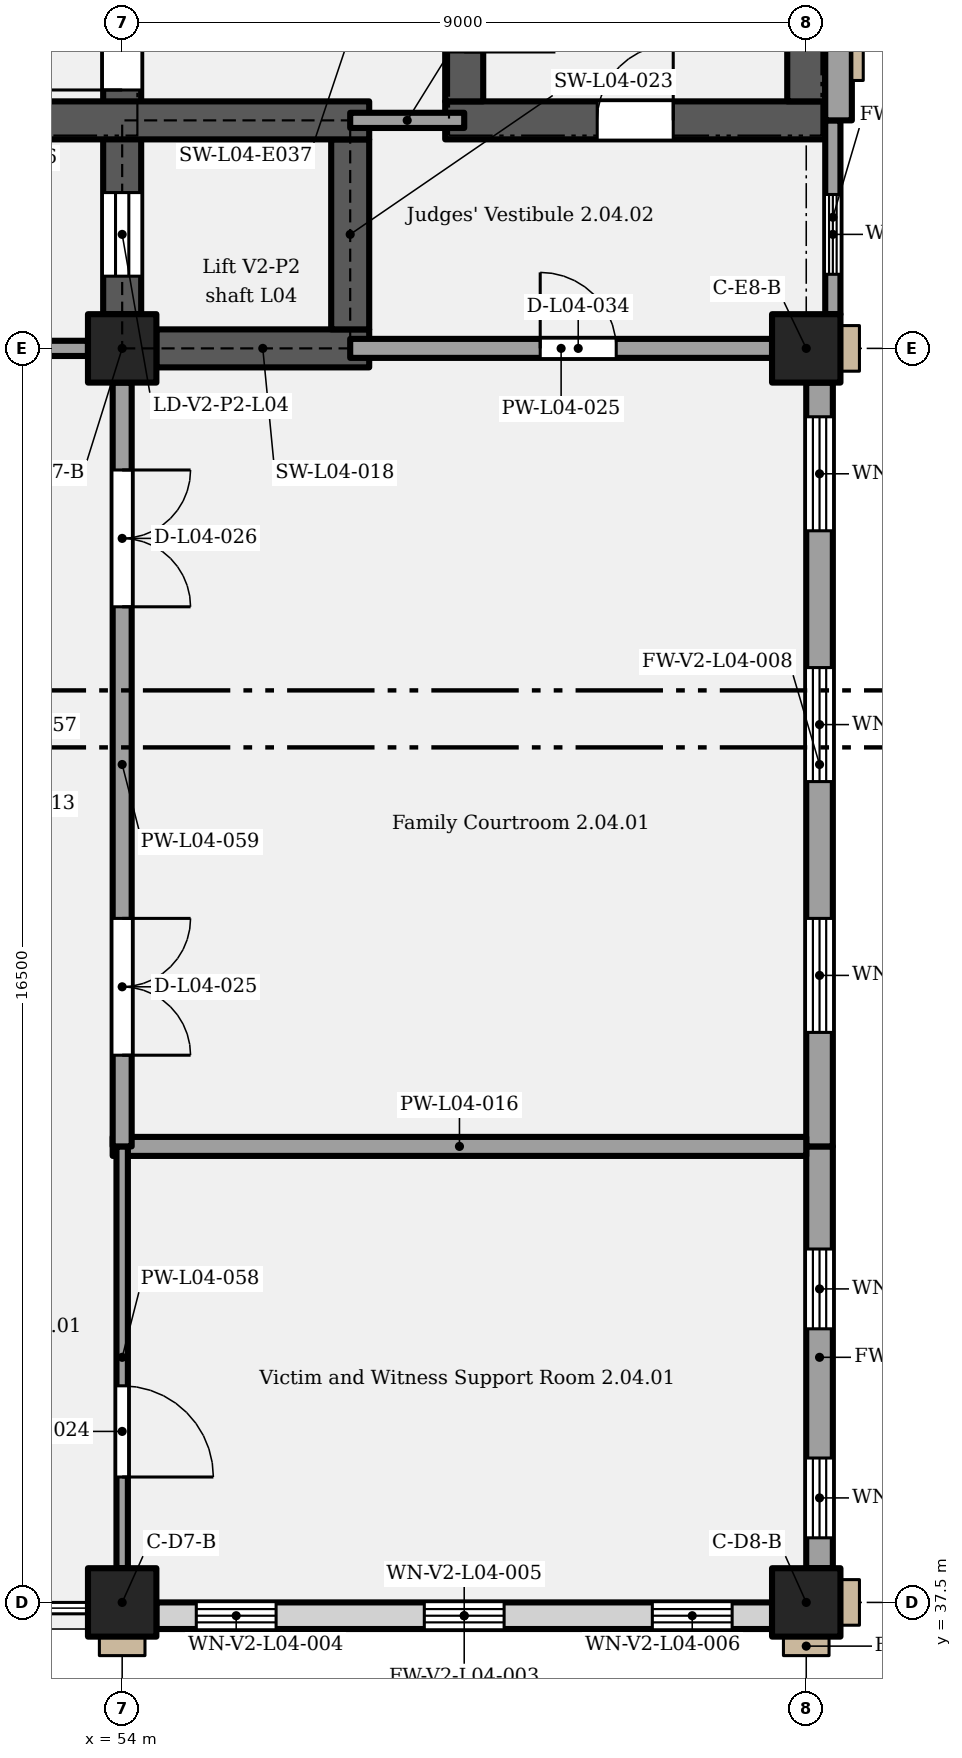
"""IFC4 building model, lengths in metres.
Left out: names, types, materials, properties, quantities, classifications, styles, units other than length and angle.
Written with IfcOpenShell. Run it as: python <this file> out.ifc"""

import sys

from ifc_helpers import new_model, si_unit, direction, frame, frame_2d, origin, origin_2d, place, context, subcontext, project, spatial, rectangle, extrude, element, fill, save


model = new_model("IFC4")
c1 = context("Model", 3, precision=1e-05, world=origin(), true_north=direction((0.0, 1.0)))
c2 = subcontext(c1, "Body", "Model", "MODEL_VIEW")
j1 = project(units=[si_unit("LENGTHUNIT", "METRE"), si_unit("PLANEANGLEUNIT", "RADIAN")], contexts=[c1])
p1 = place(None, origin())
s1 = spatial("IfcSite", under=j1, at=p1, CompositionType="ELEMENT")
p2 = place(p1, origin())
s2 = spatial("IfcBuilding", under=s1, at=p2, CompositionType="ELEMENT")
p3 = place(p2, frame((0.0, 0.0, 22.8)))
s3 = spatial("IfcBuildingStorey", under=s2, at=p3, CompositionType="ELEMENT", Elevation=22.8)
for number, where, z_axis, x_axis in (
    (1, (54.0, 37.5, 0.0), (0.0, 0.0, 1.0), (1.0, 0.0, 0.0)),
    (2, (63.0, 37.5, 0.0), (0.0, 0.0, 1.0), (1.0, 0.0, 0.0)),
    (3, (54.0, 54.0, 0.0), (0.0, 0.0, 1.0), (1.0, 0.0, 0.0)),
    (4, (63.0, 54.0, 0.0), (0.0, 0.0, 1.0), (1.0, 0.0, 0.0)),
):
    element("IfcColumn", number, at=place(p3, frame(where, z_axis=z_axis, x_axis=x_axis)), inside=s3, PredefinedType="COLUMN", context=c2, shape_type="SweptSolid", body=[
        extrude(rectangle(XDim=0.9, YDim=0.9, at=origin_2d()), origin(), (0.0, 0.0, 1.0), 5.4),
    ])
p4 = place(p3, frame((54.45, 54.0, 0.0), z_axis=(0.0, 0.0, 1.0), x_axis=(1.0, 0.0, 0.0)))
e5 = element("IfcWall", 5, at=p4, inside=s3, PredefinedType="SHEAR", context=c2, shape_type="SweptSolid", body=[
    extrude(rectangle(XDim=2.8, YDim=0.5, at=frame_2d((1.4, 0.0))), origin(), (0.0, 0.0, 1.0), 5.15),
])
p5 = place(p3, frame((57.0, 54.25, 0.0), z_axis=(0.0, 0.0, 1.0), x_axis=(0.0, 1.0, 0.0)))
e6 = element("IfcWall", 6, at=p5, inside=s3, PredefinedType="SHEAR", context=c2, shape_type="SweptSolid", body=[
    extrude(rectangle(XDim=2.5, YDim=0.5, at=frame_2d((1.25, 0.0))), origin(), (0.0, 0.0, 1.0), 5.15),
])
p6 = place(p3, frame((54.0, 54.45, 0.0), z_axis=(0.0, 0.0, 1.0), x_axis=(0.0, 1.0, 0.0)))
e7 = element("IfcWall", 7, at=p6, inside=s3, PredefinedType="SHEAR", context=c2, shape_type="SweptSolid", body=[
    extrude(rectangle(XDim=11.1, YDim=0.5, at=frame_2d((5.55, 0.0))), origin(), (0.0, 0.0, 1.0), 5.15),
])
p7 = place(p6, frame((0.5, 0.0, 0.0)))
e8 = element("IfcOpeningElement", 8, at=p7, cuts=e7, PredefinedType="OPENING", context=c2, shape_type="SweptSolid", body=[
    extrude(rectangle(XDim=1.1, YDim=2.1, at=frame_2d((0.55, 1.05))), frame((0.0, 0.26, 0.0), z_axis=(0.0, -1.0, 0.0), x_axis=(1.0, 0.0, 0.0)), (0.0, 0.0, 1.0), 0.52),
])
p8 = place(p6, frame((2.95, 0.0, 0.0)))
e9 = element("IfcOpeningElement", 9, at=p8, cuts=e7, PredefinedType="OPENING", context=c2, shape_type="SweptSolid", body=[
    extrude(rectangle(XDim=1.2, YDim=2.1, at=frame_2d((0.6, 1.05))), frame((0.0, 0.26, 0.0), z_axis=(0.0, -1.0, 0.0), x_axis=(1.0, 0.0, 0.0)), (0.0, 0.0, 1.0), 0.52),
])
p9 = place(p3, frame((46.25, 57.0, 0.0), z_axis=(0.0, 0.0, 1.0), x_axis=(1.0, 0.0, 0.0)))
e10 = element("IfcWall", 10, at=p9, inside=s3, PredefinedType="SHEAR", context=c2, shape_type="SweptSolid", body=[
    extrude(rectangle(XDim=11.0, YDim=0.5, at=frame_2d((5.5, 0.0))), origin(), (0.0, 0.0, 1.0), 5.15),
])
p10 = place(p9, frame((4.9, 0.0, 0.0)))
e11 = element("IfcOpeningElement", 11, at=p10, cuts=e10, PredefinedType="OPENING", context=c2, shape_type="SweptSolid", body=[
    extrude(rectangle(XDim=1.2, YDim=2.1, at=frame_2d((0.6, 1.05))), frame((0.0, 0.26, 0.0), z_axis=(0.0, -1.0, 0.0), x_axis=(1.0, 0.0, 0.0)), (0.0, 0.0, 1.0), 0.52),
])
p11 = place(p3, frame((58.25, 57.0, 0.0), z_axis=(0.0, 0.0, 1.0), x_axis=(1.0, 0.0, 0.0)))
e12 = element("IfcWall", 12, at=p11, inside=s3, PredefinedType="SHEAR", context=c2, shape_type="SweptSolid", body=[
    extrude(rectangle(XDim=5.0, YDim=0.5, at=frame_2d((2.5, 0.0))), origin(), (0.0, 0.0, 1.0), 5.15),
])
p12 = place(p11, frame((2.0, 0.0, 0.0)))
e13 = element("IfcOpeningElement", 13, at=p12, cuts=e12, PredefinedType="OPENING", context=c2, shape_type="SweptSolid", body=[
    extrude(rectangle(XDim=1.0, YDim=2.1, at=frame_2d((0.5, 1.05))), frame((0.0, 0.26, 0.0), z_axis=(0.0, -1.0, 0.0), x_axis=(1.0, 0.0, 0.0)), (0.0, 0.0, 1.0), 0.52),
])
p13 = place(p3, frame((58.5, 57.25, 0.0), z_axis=(0.0, 0.0, 1.0), x_axis=(0.0, 1.0, 0.0)))
e14 = element("IfcWall", 14, at=p13, inside=s3, PredefinedType="SHEAR", context=c2, shape_type="SweptSolid", body=[
    extrude(rectangle(XDim=8.5, YDim=0.5, at=frame_2d((4.25, 0.0))), origin(), (0.0, 0.0, 1.0), 5.15),
])
p14 = place(p13, frame((1.85, 0.0, 0.0), z_axis=(0.0, 0.0, 1.0), x_axis=(-1.0, 0.0, 0.0)))
e15 = element("IfcOpeningElement", 15, at=p14, cuts=e14, PredefinedType="OPENING", context=c2, shape_type="SweptSolid", body=[
    extrude(rectangle(XDim=1.2, YDim=2.1, at=frame_2d((0.6, 1.05))), frame((0.0, 0.26, 0.0), z_axis=(0.0, -1.0, 0.0), x_axis=(1.0, 0.0, 0.0)), (0.0, 0.0, 1.0), 0.52),
])
p15 = place(p3, frame((63.0, 57.25, 0.0), z_axis=(0.0, 0.0, 1.0), x_axis=(0.0, 1.0, 0.0)))
e16 = element("IfcWall", 16, at=p15, inside=s3, PredefinedType="SHEAR", context=c2, shape_type="SweptSolid", body=[
    extrude(rectangle(XDim=8.3, YDim=0.5, at=frame_2d((4.15, 0.0))), origin(), (0.0, 0.0, 1.0), 5.15),
])
p16 = place(p3, frame((54.45, 37.325, 0.0), z_axis=(0.0, 0.0, 1.0), x_axis=(1.0, 0.0, 0.0)))
e17 = element("IfcWall", 17, at=p16, inside=s3, PredefinedType="SOLIDWALL", context=c2, shape_type="SweptSolid", body=[
    extrude(rectangle(XDim=8.1, YDim=0.35, at=frame_2d((4.05, 0.0))), origin(), (0.0, 0.0, 1.0), 5.15),
])
p17 = place(p16, frame((0.525, 0.0, 1.05)))
e18 = element("IfcOpeningElement", 18, at=p17, cuts=e17, PredefinedType="OPENING", context=c2, shape_type="SweptSolid", body=[
    extrude(rectangle(XDim=1.05, YDim=2.4, at=frame_2d((0.525, 1.2))), frame((0.0, 0.185, 0.0), z_axis=(0.0, -1.0, 0.0), x_axis=(1.0, 0.0, 0.0)), (0.0, 0.0, 1.0), 0.37),
])
p18 = place(p16, frame((3.525, 0.0, 1.05)))
e19 = element("IfcOpeningElement", 19, at=p18, cuts=e17, PredefinedType="OPENING", context=c2, shape_type="SweptSolid", body=[
    extrude(rectangle(XDim=1.05, YDim=2.4, at=frame_2d((0.525, 1.2))), frame((0.0, 0.185, 0.0), z_axis=(0.0, -1.0, 0.0), x_axis=(1.0, 0.0, 0.0)), (0.0, 0.0, 1.0), 0.37),
])
p19 = place(p16, frame((6.525, 0.0, 1.05)))
e20 = element("IfcOpeningElement", 20, at=p19, cuts=e17, PredefinedType="OPENING", context=c2, shape_type="SweptSolid", body=[
    extrude(rectangle(XDim=1.05, YDim=2.4, at=frame_2d((0.525, 1.2))), frame((0.0, 0.185, 0.0), z_axis=(0.0, -1.0, 0.0), x_axis=(1.0, 0.0, 0.0)), (0.0, 0.0, 1.0), 0.37),
])
p20 = place(p3, frame((63.175, 37.95, 0.0), z_axis=(0.0, 0.0, 1.0), x_axis=(0.0, 1.0, 0.0)))
e21 = element("IfcWall", 21, at=p20, inside=s3, PredefinedType="SOLIDWALL", context=c2, shape_type="SweptSolid", body=[
    extrude(rectangle(XDim=5.55, YDim=0.35, at=frame_2d((2.775, 0.0))), origin(), (0.0, 0.0, 1.0), 5.15),
])
p21 = place(p20, frame((0.4, 0.0, 1.05)))
e22 = element("IfcOpeningElement", 22, at=p21, cuts=e21, PredefinedType="OPENING", context=c2, shape_type="SweptSolid", body=[
    extrude(rectangle(XDim=1.05, YDim=2.4, at=frame_2d((0.525, 1.2))), frame((0.0, 0.185, 0.0), z_axis=(0.0, -1.0, 0.0), x_axis=(1.0, 0.0, 0.0)), (0.0, 0.0, 1.0), 0.37),
])
p22 = place(p20, frame((3.15, 0.0, 1.05)))
e23 = element("IfcOpeningElement", 23, at=p22, cuts=e21, PredefinedType="OPENING", context=c2, shape_type="SweptSolid", body=[
    extrude(rectangle(XDim=1.05, YDim=2.4, at=frame_2d((0.525, 1.2))), frame((0.0, 0.185, 0.0), z_axis=(0.0, -1.0, 0.0), x_axis=(1.0, 0.0, 0.0)), (0.0, 0.0, 1.0), 0.37),
])
p23 = place(p3, frame((63.175, 43.5, 0.0), z_axis=(0.0, 0.0, 1.0), x_axis=(0.0, 1.0, 0.0)))
e24 = element("IfcWall", 24, at=p23, inside=s3, PredefinedType="SOLIDWALL", context=c2, shape_type="SweptSolid", body=[
    extrude(rectangle(XDim=10.05, YDim=0.35, at=frame_2d((5.025, 0.0))), origin(), (0.0, 0.0, 1.0), 5.15),
])
p24 = place(p23, frame((1.5, 0.0, 1.05)))
e25 = element("IfcOpeningElement", 25, at=p24, cuts=e24, PredefinedType="OPENING", context=c2, shape_type="SweptSolid", body=[
    extrude(rectangle(XDim=1.5, YDim=3.5, at=frame_2d((0.75, 1.75))), frame((0.0, 0.185, 0.0), z_axis=(0.0, -1.0, 0.0), x_axis=(1.0, 0.0, 0.0)), (0.0, 0.0, 1.0), 0.37),
])
p25 = place(p23, frame((4.8, 0.0, 1.05)))
e26 = element("IfcOpeningElement", 26, at=p25, cuts=e24, PredefinedType="OPENING", context=c2, shape_type="SweptSolid", body=[
    extrude(rectangle(XDim=1.5, YDim=3.5, at=frame_2d((0.75, 1.75))), frame((0.0, 0.185, 0.0), z_axis=(0.0, -1.0, 0.0), x_axis=(1.0, 0.0, 0.0)), (0.0, 0.0, 1.0), 0.37),
])
p26 = place(p23, frame((8.1, 0.0, 1.05)))
e27 = element("IfcOpeningElement", 27, at=p26, cuts=e24, PredefinedType="OPENING", context=c2, shape_type="SweptSolid", body=[
    extrude(rectangle(XDim=1.5, YDim=3.5, at=frame_2d((0.75, 1.75))), frame((0.0, 0.185, 0.0), z_axis=(0.0, -1.0, 0.0), x_axis=(1.0, 0.0, 0.0)), (0.0, 0.0, 1.0), 0.37),
])
p27 = place(p3, frame((63.35, 54.45, 0.0), z_axis=(0.0, 0.0, 1.0), x_axis=(0.0, 1.0, 0.0)))
e28 = element("IfcWall", 28, at=p27, inside=s3, PredefinedType="SOLIDWALL", context=c2, shape_type="SweptSolid", body=[
    extrude(rectangle(XDim=2.55, YDim=0.2, at=frame_2d((1.275, 0.0))), origin(), (0.0, 0.0, 1.0), 5.15),
])
p28 = place(p27, frame((0.525, 0.0, 1.05)))
e29 = element("IfcOpeningElement", 29, at=p28, cuts=e28, PredefinedType="OPENING", context=c2, shape_type="SweptSolid", body=[
    extrude(rectangle(XDim=1.05, YDim=2.4, at=frame_2d((0.525, 1.2))), frame((0.0, 0.11, 0.0), z_axis=(0.0, -1.0, 0.0), x_axis=(1.0, 0.0, 0.0)), (0.0, 0.0, 1.0), 0.22),
])
p29 = place(p3, frame((63.425, 57.0, 0.0), z_axis=(0.0, 0.0, 1.0), x_axis=(0.0, 1.0, 0.0)))
e30 = element("IfcWall", 30, at=p29, inside=s3, PredefinedType="SOLIDWALL", context=c2, shape_type="SweptSolid", body=[
    extrude(rectangle(XDim=8.55, YDim=0.35, at=frame_2d((4.275, 0.0))), origin(), (0.0, 0.0, 1.0), 5.15),
])
p30 = place(p3, frame((53.875, 43.5, 0.0), z_axis=(0.0, 0.0, 1.0), x_axis=(1.0, 0.0, 0.0)))
e31 = element("IfcWall", 31, at=p30, inside=s3, PredefinedType="PARTITIONING", context=c2, shape_type="SweptSolid", body=[
    extrude(rectangle(XDim=9.125, YDim=0.25, at=frame_2d((4.562, 0.0))), origin(), (0.0, 0.0, 1.0), 5.15),
])
p31 = place(p3, frame((49.5, 54.0, 0.0), z_axis=(0.0, 0.0, 1.0), x_axis=(1.0, 0.0, 0.0)))
e32 = element("IfcWall", 32, at=p31, inside=s3, PredefinedType="PARTITIONING", context=c2, shape_type="SweptSolid", body=[
    extrude(rectangle(XDim=4.05, YDim=0.2, at=frame_2d((2.025, 0.0))), origin(), (0.0, 0.0, 1.0), 4.4),
])
p32 = place(p31, frame((1.35, 0.0, 0.0)))
e33 = element("IfcOpeningElement", 33, at=p32, cuts=e32, PredefinedType="OPENING", context=c2, shape_type="SweptSolid", body=[
    extrude(rectangle(XDim=1.8, YDim=2.1, at=frame_2d((0.9, 1.05))), frame((0.0, 0.11, 0.0), z_axis=(0.0, -1.0, 0.0), x_axis=(1.0, 0.0, 0.0)), (0.0, 0.0, 1.0), 0.22),
])
p33 = place(p3, frame((57.0, 54.0, 0.0), z_axis=(0.0, 0.0, 1.0), x_axis=(1.0, 0.0, 0.0)))
e34 = element("IfcWall", 34, at=p33, inside=s3, PredefinedType="PARTITIONING", context=c2, shape_type="SweptSolid", body=[
    extrude(rectangle(XDim=5.55, YDim=0.25, at=frame_2d((2.775, 0.0))), origin(), (0.0, 0.0, 1.0), 4.4),
])
p34 = place(p33, frame((2.5, 0.0, 0.0)))
e35 = element("IfcOpeningElement", 35, at=p34, cuts=e34, PredefinedType="OPENING", context=c2, shape_type="SweptSolid", body=[
    extrude(rectangle(XDim=1.0, YDim=2.1, at=frame_2d((0.5, 1.05))), frame((0.0, 0.135, 0.0), z_axis=(0.0, -1.0, 0.0), x_axis=(1.0, 0.0, 0.0)), (0.0, 0.0, 1.0), 0.27),
])
p35 = place(p3, frame((57.0, 57.0, 0.0), z_axis=(0.0, 0.0, 1.0), x_axis=(1.0, 0.0, 0.0)))
e36 = element("IfcWall", 36, at=p35, inside=s3, PredefinedType="PARTITIONING", context=c2, shape_type="SweptSolid", body=[
    extrude(rectangle(XDim=1.5, YDim=0.2, at=frame_2d((0.75, 0.0))), origin(), (0.0, 0.0, 1.0), 5.15),
])
p36 = place(p3, frame((54.0, 37.95, 0.0), z_axis=(0.0, 0.0, 1.0), x_axis=(0.0, 1.0, 0.0)))
e37 = element("IfcWall", 37, at=p36, inside=s3, PredefinedType="PARTITIONING", context=c2, shape_type="SweptSolid", body=[
    extrude(rectangle(XDim=5.55, YDim=0.15, at=frame_2d((2.775, 0.0))), origin(), (0.0, 0.0, 1.0), 4.2),
])
p37 = place(p36, frame((2.4, 0.0, 0.0), z_axis=(0.0, 0.0, 1.0), x_axis=(-1.0, 0.0, 0.0)))
e38 = element("IfcOpeningElement", 38, at=p37, cuts=e37, PredefinedType="OPENING", context=c2, shape_type="SweptSolid", body=[
    extrude(rectangle(XDim=1.2, YDim=2.1, at=frame_2d((0.6, 1.05))), frame((0.0, 0.085, 0.0), z_axis=(0.0, -1.0, 0.0), x_axis=(1.0, 0.0, 0.0)), (0.0, 0.0, 1.0), 0.17),
])
p38 = place(p3, frame((54.0, 43.5, 0.0), z_axis=(0.0, 0.0, 1.0), x_axis=(0.0, 1.0, 0.0)))
e39 = element("IfcWall", 39, at=p38, inside=s3, PredefinedType="PARTITIONING", context=c2, shape_type="SweptSolid", body=[
    extrude(rectangle(XDim=10.05, YDim=0.25, at=frame_2d((5.025, 0.0))), origin(), (0.0, 0.0, 1.0), 4.2),
])
p39 = place(p38, frame((3.0, 0.0, 0.0), z_axis=(0.0, 0.0, 1.0), x_axis=(-1.0, 0.0, 0.0)))
e40 = element("IfcOpeningElement", 40, at=p39, cuts=e39, PredefinedType="OPENING", context=c2, shape_type="SweptSolid", body=[
    extrude(rectangle(XDim=1.8, YDim=2.4, at=frame_2d((0.9, 1.2))), frame((0.0, 0.135, 0.0), z_axis=(0.0, -1.0, 0.0), x_axis=(1.0, 0.0, 0.0)), (0.0, 0.0, 1.0), 0.27),
])
p40 = place(p38, frame((8.9, 0.0, 0.0), z_axis=(0.0, 0.0, 1.0), x_axis=(-1.0, 0.0, 0.0)))
e41 = element("IfcOpeningElement", 41, at=p40, cuts=e39, PredefinedType="OPENING", context=c2, shape_type="SweptSolid", body=[
    extrude(rectangle(XDim=1.8, YDim=2.4, at=frame_2d((0.9, 1.2))), frame((0.0, 0.135, 0.0), z_axis=(0.0, -1.0, 0.0), x_axis=(1.0, 0.0, 0.0)), (0.0, 0.0, 1.0), 0.27),
])
p41 = place(p17, origin())
e42 = element("IfcWindow", 42, at=p41, inside=s3, PartitioningType="SINGLE_PANEL", PredefinedType="WINDOW", context=c2, shape_type="SweptSolid", body=[
    extrude(rectangle(XDim=1.05, YDim=2.4, at=frame_2d((0.525, 1.2))), frame((0.0, 0.03, 0.0), z_axis=(0.0, -1.0, 0.0), x_axis=(1.0, 0.0, 0.0)), (0.0, 0.0, 1.0), 0.06),
])
fill(e18, e42)
p42 = place(p18, origin())
e43 = element("IfcWindow", 43, at=p42, inside=s3, PartitioningType="SINGLE_PANEL", PredefinedType="WINDOW", context=c2, shape_type="SweptSolid", body=[
    extrude(rectangle(XDim=1.05, YDim=2.4, at=frame_2d((0.525, 1.2))), frame((0.0, 0.03, 0.0), z_axis=(0.0, -1.0, 0.0), x_axis=(1.0, 0.0, 0.0)), (0.0, 0.0, 1.0), 0.06),
])
fill(e19, e43)
p43 = place(p19, origin())
e44 = element("IfcWindow", 44, at=p43, inside=s3, PartitioningType="SINGLE_PANEL", PredefinedType="WINDOW", context=c2, shape_type="SweptSolid", body=[
    extrude(rectangle(XDim=1.05, YDim=2.4, at=frame_2d((0.525, 1.2))), frame((0.0, 0.03, 0.0), z_axis=(0.0, -1.0, 0.0), x_axis=(1.0, 0.0, 0.0)), (0.0, 0.0, 1.0), 0.06),
])
fill(e20, e44)
p44 = place(p21, origin())
e45 = element("IfcWindow", 45, at=p44, inside=s3, PartitioningType="SINGLE_PANEL", PredefinedType="WINDOW", context=c2, shape_type="SweptSolid", body=[
    extrude(rectangle(XDim=1.05, YDim=2.4, at=frame_2d((0.525, 1.2))), frame((0.0, 0.03, 0.0), z_axis=(0.0, -1.0, 0.0), x_axis=(1.0, 0.0, 0.0)), (0.0, 0.0, 1.0), 0.06),
])
fill(e22, e45)
p45 = place(p22, origin())
e46 = element("IfcWindow", 46, at=p45, inside=s3, PartitioningType="SINGLE_PANEL", PredefinedType="WINDOW", context=c2, shape_type="SweptSolid", body=[
    extrude(rectangle(XDim=1.05, YDim=2.4, at=frame_2d((0.525, 1.2))), frame((0.0, 0.03, 0.0), z_axis=(0.0, -1.0, 0.0), x_axis=(1.0, 0.0, 0.0)), (0.0, 0.0, 1.0), 0.06),
])
fill(e23, e46)
p46 = place(p24, origin())
e47 = element("IfcWindow", 47, at=p46, inside=s3, PartitioningType="SINGLE_PANEL", PredefinedType="WINDOW", context=c2, shape_type="SweptSolid", body=[
    extrude(rectangle(XDim=1.5, YDim=3.5, at=frame_2d((0.75, 1.75))), frame((0.0, 0.03, 0.0), z_axis=(0.0, -1.0, 0.0), x_axis=(1.0, 0.0, 0.0)), (0.0, 0.0, 1.0), 0.06),
])
fill(e25, e47)
p47 = place(p25, origin())
e48 = element("IfcWindow", 48, at=p47, inside=s3, PartitioningType="SINGLE_PANEL", PredefinedType="WINDOW", context=c2, shape_type="SweptSolid", body=[
    extrude(rectangle(XDim=1.5, YDim=3.5, at=frame_2d((0.75, 1.75))), frame((0.0, 0.03, 0.0), z_axis=(0.0, -1.0, 0.0), x_axis=(1.0, 0.0, 0.0)), (0.0, 0.0, 1.0), 0.06),
])
fill(e26, e48)
p48 = place(p26, origin())
e49 = element("IfcWindow", 49, at=p48, inside=s3, PartitioningType="SINGLE_PANEL", PredefinedType="WINDOW", context=c2, shape_type="SweptSolid", body=[
    extrude(rectangle(XDim=1.5, YDim=3.5, at=frame_2d((0.75, 1.75))), frame((0.0, 0.03, 0.0), z_axis=(0.0, -1.0, 0.0), x_axis=(1.0, 0.0, 0.0)), (0.0, 0.0, 1.0), 0.06),
])
fill(e27, e49)
p49 = place(p28, origin())
e50 = element("IfcWindow", 50, at=p49, inside=s3, PartitioningType="SINGLE_PANEL", PredefinedType="WINDOW", context=c2, shape_type="SweptSolid", body=[
    extrude(rectangle(XDim=1.05, YDim=2.4, at=frame_2d((0.525, 1.2))), frame((0.0, 0.03, 0.0), z_axis=(0.0, -1.0, 0.0), x_axis=(1.0, 0.0, 0.0)), (0.0, 0.0, 1.0), 0.06),
])
fill(e29, e50)
p50 = place(p7, origin())
e51 = element("IfcDoor", 51, at=p50, inside=s3, OperationType="SLIDING_TO_LEFT", PredefinedType="DOOR", context=c2, shape_type="SweptSolid", body=[
    extrude(rectangle(XDim=1.1, YDim=2.1, at=frame_2d((0.55, 1.05))), frame((0.0, 0.025, 0.0), z_axis=(0.0, -1.0, 0.0), x_axis=(1.0, 0.0, 0.0)), (0.0, 0.0, 1.0), 0.05),
])
fill(e8, e51)
p51 = place(p8, origin())
e52 = element("IfcDoor", 52, at=p51, inside=s3, OperationType="SINGLE_SWING_LEFT", PredefinedType="DOOR", context=c2, shape_type="SweptSolid", body=[
    extrude(rectangle(XDim=1.2, YDim=2.1, at=frame_2d((0.6, 1.05))), frame((0.0, 0.025, 0.0), z_axis=(0.0, -1.0, 0.0), x_axis=(1.0, 0.0, 0.0)), (0.0, 0.0, 1.0), 0.05),
])
fill(e9, e52)
p52 = place(p14, origin())
e53 = element("IfcDoor", 53, at=p52, inside=s3, OperationType="SINGLE_SWING_RIGHT", PredefinedType="DOOR", context=c2, shape_type="SweptSolid", body=[
    extrude(rectangle(XDim=1.2, YDim=2.1, at=frame_2d((0.6, 1.05))), frame((0.0, 0.025, 0.0), z_axis=(0.0, -1.0, 0.0), x_axis=(1.0, 0.0, 0.0)), (0.0, 0.0, 1.0), 0.05),
])
fill(e15, e53)
p53 = place(p37, origin())
e54 = element("IfcDoor", 54, at=p53, inside=s3, OperationType="SINGLE_SWING_RIGHT", PredefinedType="DOOR", context=c2, shape_type="SweptSolid", body=[
    extrude(rectangle(XDim=1.2, YDim=2.1, at=frame_2d((0.6, 1.05))), frame((0.0, 0.025, 0.0), z_axis=(0.0, -1.0, 0.0), x_axis=(1.0, 0.0, 0.0)), (0.0, 0.0, 1.0), 0.05),
])
fill(e38, e54)
p54 = place(p39, origin())
e55 = element("IfcDoor", 55, at=p54, inside=s3, OperationType="DOUBLE_DOOR_SINGLE_SWING", PredefinedType="DOOR", context=c2, shape_type="SweptSolid", body=[
    extrude(rectangle(XDim=1.8, YDim=2.4, at=frame_2d((0.9, 1.2))), frame((0.0, 0.025, 0.0), z_axis=(0.0, -1.0, 0.0), x_axis=(1.0, 0.0, 0.0)), (0.0, 0.0, 1.0), 0.05),
])
fill(e40, e55)
p55 = place(p40, origin())
e56 = element("IfcDoor", 56, at=p55, inside=s3, OperationType="DOUBLE_DOOR_SINGLE_SWING", PredefinedType="DOOR", context=c2, shape_type="SweptSolid", body=[
    extrude(rectangle(XDim=1.8, YDim=2.4, at=frame_2d((0.9, 1.2))), frame((0.0, 0.025, 0.0), z_axis=(0.0, -1.0, 0.0), x_axis=(1.0, 0.0, 0.0)), (0.0, 0.0, 1.0), 0.05),
])
fill(e41, e56)
p56 = place(p12, origin())
e57 = element("IfcDoor", 57, at=p56, inside=s3, OperationType="SINGLE_SWING_RIGHT", PredefinedType="DOOR", context=c2, shape_type="SweptSolid", body=[
    extrude(rectangle(XDim=1.0, YDim=2.1, at=frame_2d((0.5, 1.05))), frame((0.0, 0.025, 0.0), z_axis=(0.0, -1.0, 0.0), x_axis=(1.0, 0.0, 0.0)), (0.0, 0.0, 1.0), 0.05),
])
fill(e13, e57)
p57 = place(p34, origin())
e58 = element("IfcDoor", 58, at=p57, inside=s3, OperationType="SINGLE_SWING_LEFT", PredefinedType="DOOR", context=c2, shape_type="SweptSolid", body=[
    extrude(rectangle(XDim=1.0, YDim=2.1, at=frame_2d((0.5, 1.05))), frame((0.0, 0.025, 0.0), z_axis=(0.0, -1.0, 0.0), x_axis=(1.0, 0.0, 0.0)), (0.0, 0.0, 1.0), 0.05),
])
fill(e35, e58)
save(model, sys.argv[1])
